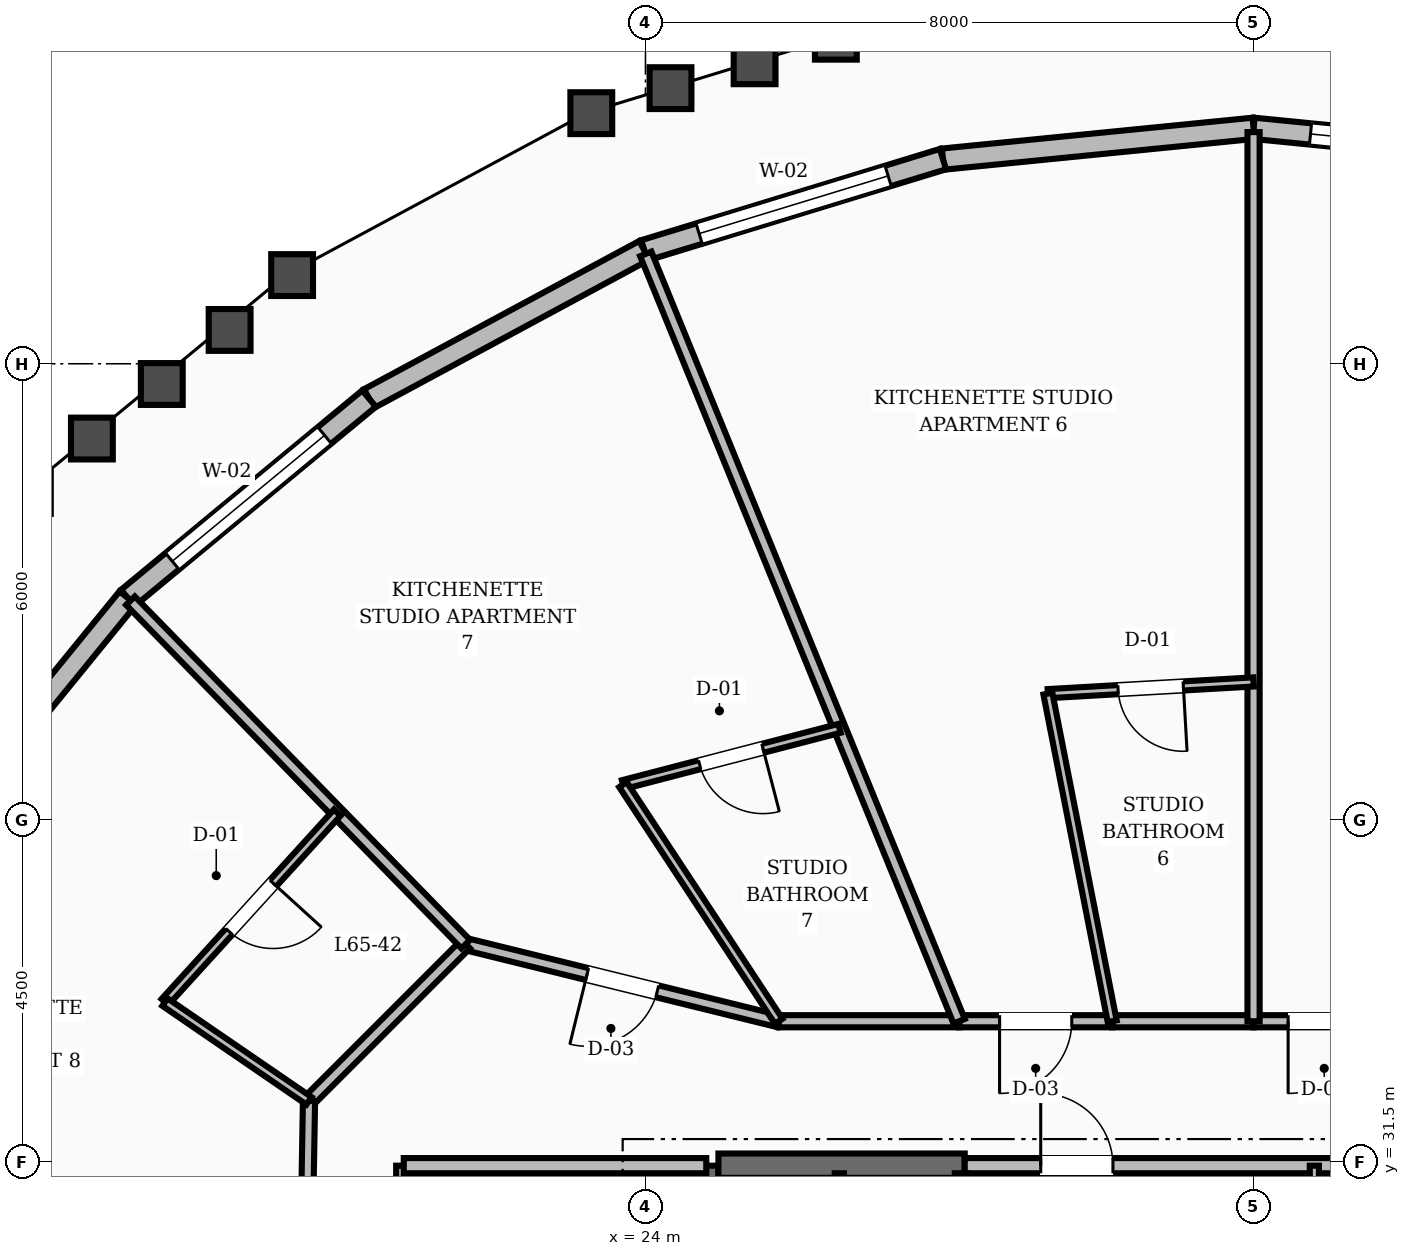
"""IFC4 building model, lengths in metres.
Left out: names, types, materials, properties, quantities, classifications, styles, units other than length and angle.
Written with IfcOpenShell. Run it as: python <this file> out.ifc"""

import sys

from ifc_helpers import new_model, si_unit, direction, frame, frame_2d, origin, place, context, subcontext, project, spatial, rectangle, extrude, element, fill, save


model = new_model("IFC4")
c1 = context("Model", 3, precision=1e-05, world=origin(), true_north=direction((0.0, 1.0)))
c2 = subcontext(c1, "Body", "Model", "MODEL_VIEW")
j1 = project(units=[si_unit("LENGTHUNIT", "METRE"), si_unit("PLANEANGLEUNIT", "RADIAN")], contexts=[c1])
p1 = place(None, origin())
s1 = spatial("IfcSite", under=j1, at=p1, CompositionType="ELEMENT")
p2 = place(p1, origin())
s2 = spatial("IfcBuilding", under=s1, at=p2, CompositionType="ELEMENT")
p3 = place(p2, frame((0.0, 0.0, 250.8)))
s3 = spatial("IfcBuildingStorey", under=s2, at=p3, CompositionType="ELEMENT", Elevation=250.8)
p4 = place(p3, frame((24.8, 25.15, 0.0), z_axis=(0.0, 0.0, 1.0), x_axis=(0.0, 1.0, 0.0)))
e1 = element("IfcWall", 1, at=p4, inside=s3, PredefinedType="SHEAR", context=c2, shape_type="SweptSolid", body=[
    extrude(rectangle(XDim=6.3, YDim=0.32, at=frame_2d((3.15, 0.0))), origin(), (0.0, 0.0, 1.0), 3.6),
])
p5 = place(p3, frame((24.96, 31.45, 0.0), z_axis=(0.0, 0.0, 1.0), x_axis=(1.0, 0.0, 0.0)))
e2 = element("IfcWall", 2, at=p5, inside=s3, PredefinedType="SHEAR", context=c2, shape_type="SweptSolid", body=[
    extrude(rectangle(XDim=3.24, YDim=0.32, at=frame_2d((1.62, 0.0))), origin(), (0.0, 0.0, 1.0), 3.6),
])
p6 = place(p3, frame((36.086, 44.692, 0.0), z_axis=(0.0, 0.0, 1.0), x_axis=(-0.995111670603, 0.098756078441, 0.0)))
e3 = element("IfcWall", 3, at=p6, inside=s3, PredefinedType="STANDARD", context=c2, shape_type="SweptSolid", body=[
    extrude(rectangle(XDim=4.106, YDim=0.28, at=frame_2d((2.053, 0.0))), origin(), (0.0, 0.0, 1.0), 2.88),
])
p7 = place(p6, frame((0.753, 0.0, 0.8)))
e4 = element("IfcOpeningElement", 4, at=p7, cuts=e3, PredefinedType="OPENING", context=c2, shape_type="SweptSolid", body=[
    extrude(rectangle(XDim=2.6, YDim=1.65, at=frame_2d((1.3, 0.825))), frame((0.0, 0.15, 0.0), z_axis=(0.0, -1.0, 0.0), x_axis=(1.0, 0.0, 0.0)), (0.0, 0.0, 1.0), 0.3),
])
p8 = place(p3, frame((32.0, 45.098, 0.0), z_axis=(0.0, 0.0, 1.0), x_axis=(-0.995111670603, -0.098756078441, 0.0)))
e5 = element("IfcWall", 5, at=p8, inside=s3, PredefinedType="STANDARD", context=c2, shape_type="SweptSolid", body=[
    extrude(rectangle(XDim=4.106, YDim=0.28, at=frame_2d((2.053, 0.0))), origin(), (0.0, 0.0, 1.0), 2.88),
])
p9 = place(p3, frame((27.914, 44.692, 0.0), z_axis=(0.0, 0.0, 1.0), x_axis=(-0.956361719018, -0.292185322009, 0.0)))
e6 = element("IfcWall", 6, at=p9, inside=s3, PredefinedType="STANDARD", context=c2, shape_type="SweptSolid", body=[
    extrude(rectangle(XDim=4.108, YDim=0.28, at=frame_2d((2.054, 0.0))), origin(), (0.0, 0.0, 1.0), 2.88),
])
p10 = place(p9, frame((0.754, 0.0, 0.8)))
e7 = element("IfcOpeningElement", 7, at=p10, cuts=e6, PredefinedType="OPENING", context=c2, shape_type="SweptSolid", body=[
    extrude(rectangle(XDim=2.6, YDim=1.65, at=frame_2d((1.3, 0.825))), frame((0.0, 0.15, 0.0), z_axis=(0.0, -1.0, 0.0), x_axis=(1.0, 0.0, 0.0)), (0.0, 0.0, 1.0), 0.3),
])
p11 = place(p3, frame((23.985, 43.492, 0.0), z_axis=(0.0, 0.0, 1.0), x_axis=(-0.880482536711, -0.474078582671, 0.0)))
e8 = element("IfcWall", 8, at=p11, inside=s3, PredefinedType="STANDARD", context=c2, shape_type="SweptSolid", body=[
    extrude(rectangle(XDim=4.113, YDim=0.28, at=frame_2d((2.056, 0.0))), origin(), (0.0, 0.0, 1.0), 2.88),
])
p12 = place(p3, frame((20.364, 41.542, 0.0), z_axis=(0.0, 0.0, 1.0), x_axis=(-0.770756680857, -0.637129609197, 0.0)))
e9 = element("IfcWall", 9, at=p12, inside=s3, PredefinedType="STANDARD", context=c2, shape_type="SweptSolid", body=[
    extrude(rectangle(XDim=4.118, YDim=0.28, at=frame_2d((2.059, 0.0))), origin(), (0.0, 0.0, 1.0), 2.88),
])
p13 = place(p12, frame((0.759, 0.0, 0.8)))
e10 = element("IfcOpeningElement", 10, at=p13, cuts=e9, PredefinedType="OPENING", context=c2, shape_type="SweptSolid", body=[
    extrude(rectangle(XDim=2.6, YDim=1.65, at=frame_2d((1.3, 0.825))), frame((0.0, 0.15, 0.0), z_axis=(0.0, -1.0, 0.0), x_axis=(1.0, 0.0, 0.0)), (0.0, 0.0, 1.0), 0.3),
])
p14 = place(p3, frame((17.189, 38.918, 0.0), z_axis=(0.0, 0.0, 1.0), x_axis=(-0.631637370097, -0.775263976138, 0.0)))
e11 = element("IfcWall", 11, at=p14, inside=s3, PredefinedType="STANDARD", context=c2, shape_type="SweptSolid", body=[
    extrude(rectangle(XDim=4.124, YDim=0.28, at=frame_2d((2.062, 0.0))), origin(), (0.0, 0.0, 1.0), 2.88),
])
p15 = place(p3, frame((20.82, 28.32, 0.0), z_axis=(0.0, 0.0, 1.0), x_axis=(0.0, 1.0, 0.0)))
e12 = element("IfcWall", 12, at=p15, inside=s3, PredefinedType="SOLIDWALL", context=c2, shape_type="SweptSolid", body=[
    extrude(rectangle(XDim=3.13, YDim=0.2, at=frame_2d((1.565, 0.0))), origin(), (0.0, 0.0, 1.0), 2.87),
])
p16 = place(p15, frame((1.09, 0.0, 0.0)))
e13 = element("IfcOpeningElement", 13, at=p16, cuts=e12, PredefinedType="OPENING", context=c2, shape_type="SweptSolid", body=[
    extrude(rectangle(XDim=0.95, YDim=2.1, at=frame_2d((0.475, 1.05))), frame((0.0, 0.11, 0.0), z_axis=(0.0, -1.0, 0.0), x_axis=(1.0, 0.0, 0.0)), (0.0, 0.0, 1.0), 0.22),
])
p17 = place(p3, frame((20.82, 31.45, 0.0), z_axis=(0.0, 0.0, 1.0), x_axis=(1.0, 0.0, 0.0)))
e14 = element("IfcWall", 14, at=p17, inside=s3, PredefinedType="SOLIDWALL", context=c2, shape_type="SweptSolid", body=[
    extrude(rectangle(XDim=3.98, YDim=0.2, at=frame_2d((1.99, 0.0))), origin(), (0.0, 0.0, 1.0), 2.87),
])
p18 = place(p3, frame((28.2, 31.45, 0.0), z_axis=(0.0, 0.0, 1.0), x_axis=(1.0, 0.0, 0.0)))
e15 = element("IfcWall", 15, at=p18, inside=s3, PredefinedType="SOLIDWALL", context=c2, shape_type="SweptSolid", body=[
    extrude(rectangle(XDim=7.6, YDim=0.2, at=frame_2d((3.8, 0.0))), origin(), (0.0, 0.0, 1.0), 2.87),
])
p19 = place(p18, frame((1.0, 0.0, 0.0)))
e16 = element("IfcOpeningElement", 16, at=p19, cuts=e15, PredefinedType="OPENING", context=c2, shape_type="SweptSolid", body=[
    extrude(rectangle(XDim=0.95, YDim=2.1, at=frame_2d((0.475, 1.05))), frame((0.0, 0.11, 0.0), z_axis=(0.0, -1.0, 0.0), x_axis=(1.0, 0.0, 0.0)), (0.0, 0.0, 1.0), 0.22),
])
p20 = place(p3, frame((32.8, 27.95, 0.0), z_axis=(0.0, 0.0, 1.0), x_axis=(0.0, 1.0, 0.0)))
e17 = element("IfcWall", 17, at=p20, inside=s3, PredefinedType="PARTITIONING", context=c2, shape_type="SweptSolid", body=[
    extrude(rectangle(XDim=3.5, YDim=0.12, at=frame_2d((1.75, 0.0))), origin(), (0.0, 0.0, 1.0), 2.87),
])
p21 = place(p3, frame((28.15, 25.25, 0.0), z_axis=(0.0, 0.0, 1.0), x_axis=(0.0, 1.0, 0.0)))
e18 = element("IfcWall", 18, at=p21, inside=s3, PredefinedType="SOLIDWALL", context=c2, shape_type="SweptSolid", body=[
    extrude(rectangle(XDim=6.1, YDim=0.16, at=frame_2d((3.05, 0.0))), origin(), (0.0, 0.0, 1.0), 2.87),
])
p22 = place(p3, frame((26.55, 27.6, 0.0), z_axis=(0.0, 0.0, 1.0), x_axis=(0.0, 1.0, 0.0)))
e19 = element("IfcWall", 19, at=p22, inside=s3, PredefinedType="PARTITIONING", context=c2, shape_type="SweptSolid", body=[
    extrude(rectangle(XDim=3.75, YDim=0.12, at=frame_2d((1.875, 0.0))), origin(), (0.0, 0.0, 1.0), 2.87),
])
p23 = place(p3, frame((33.86, 33.35, 0.0), z_axis=(0.0, 0.0, 1.0), x_axis=(-1.0, 0.0, 0.0)))
e20 = element("IfcWall", 20, at=p23, inside=s3, PredefinedType="SOLIDWALL", context=c2, shape_type="SweptSolid", body=[
    extrude(rectangle(XDim=1.86, YDim=0.16, at=frame_2d((0.93, 0.0))), origin(), (0.0, 0.0, 1.0), 2.87),
])
p24 = place(p23, frame((0.455, 0.0, 0.0)))
e21 = element("IfcOpeningElement", 21, at=p24, cuts=e20, PredefinedType="OPENING", context=c2, shape_type="SweptSolid", body=[
    extrude(rectangle(XDim=0.95, YDim=2.1, at=frame_2d((0.475, 1.05))), frame((0.0, 0.09, 0.0), z_axis=(0.0, -1.0, 0.0), x_axis=(1.0, 0.0, 0.0)), (0.0, 0.0, 1.0), 0.18),
])
p25 = place(p3, frame((32.0, 33.35, 0.0), z_axis=(0.0, 0.0, 1.0), x_axis=(-1.0, 0.0, 0.0)))
e22 = element("IfcWall", 22, at=p25, inside=s3, PredefinedType="SOLIDWALL", context=c2, shape_type="SweptSolid", body=[
    extrude(rectangle(XDim=1.86, YDim=0.16, at=frame_2d((0.93, 0.0))), origin(), (0.0, 0.0, 1.0), 2.87),
])
p26 = place(p3, frame((30.14, 33.35, 0.0), z_axis=(0.0, 0.0, 1.0), x_axis=(-1.0, 0.0, 0.0)))
e23 = element("IfcWall", 23, at=p26, inside=s3, PredefinedType="SOLIDWALL", context=c2, shape_type="SweptSolid", body=[
    extrude(rectangle(XDim=2.013, YDim=0.16, at=frame_2d((1.006, 0.0))), origin(), (0.0, 0.0, 1.0), 2.87),
])
p27 = place(p26, frame((0.531, 0.0, 0.0)))
e24 = element("IfcOpeningElement", 24, at=p27, cuts=e23, PredefinedType="OPENING", context=c2, shape_type="SweptSolid", body=[
    extrude(rectangle(XDim=0.95, YDim=2.1, at=frame_2d((0.475, 1.05))), frame((0.0, 0.09, 0.0), z_axis=(0.0, -1.0, 0.0), x_axis=(1.0, 0.0, 0.0)), (0.0, 0.0, 1.0), 0.18),
])
p28 = place(p3, frame((28.127, 33.35, 0.0), z_axis=(0.0, 0.0, 1.0), x_axis=(-1.0, 0.0, 0.0)))
e25 = element("IfcWall", 25, at=p28, inside=s3, PredefinedType="SOLIDWALL", context=c2, shape_type="SweptSolid", body=[
    extrude(rectangle(XDim=2.375, YDim=0.16, at=frame_2d((1.188, 0.0))), origin(), (0.0, 0.0, 1.0), 2.87),
])
p29 = place(p3, frame((25.752, 33.35, 0.0), z_axis=(0.0, 0.0, 1.0), x_axis=(-0.970939799552, 0.239323850978, 0.0)))
e26 = element("IfcWall", 26, at=p29, inside=s3, PredefinedType="SOLIDWALL", context=c2, shape_type="SweptSolid", body=[
    extrude(rectangle(XDim=4.241, YDim=0.16, at=frame_2d((2.12, 0.0))), origin(), (0.0, 0.0, 1.0), 2.87),
])
p30 = place(p29, frame((1.646, 0.0, 0.0)))
e27 = element("IfcOpeningElement", 27, at=p30, cuts=e26, PredefinedType="OPENING", context=c2, shape_type="SweptSolid", body=[
    extrude(rectangle(XDim=0.95, YDim=2.1, at=frame_2d((0.475, 1.05))), frame((0.0, 0.09, 0.0), z_axis=(0.0, -1.0, 0.0), x_axis=(1.0, 0.0, 0.0)), (0.0, 0.0, 1.0), 0.18),
])
p31 = place(p3, frame((21.635, 34.365, 0.0), z_axis=(0.0, 0.0, 1.0), x_axis=(-0.707106781187, -0.707106781187, 0.0)))
e28 = element("IfcWall", 28, at=p31, inside=s3, PredefinedType="SOLIDWALL", context=c2, shape_type="SweptSolid", body=[
    extrude(rectangle(XDim=2.916, YDim=0.16, at=frame_2d((1.458, 0.0))), origin(), (0.0, 0.0, 1.0), 2.87),
])
p32 = place(p3, frame((19.573, 32.303, 0.0), z_axis=(0.0, 0.0, 1.0), x_axis=(-0.016981035134, -0.999855811828, 0.0)))
e29 = element("IfcWall", 29, at=p32, inside=s3, PredefinedType="SOLIDWALL", context=c2, shape_type="SweptSolid", body=[
    extrude(rectangle(XDim=3.134, YDim=0.16, at=frame_2d((1.567, 0.0))), origin(), (0.0, 0.0, 1.0), 2.87),
])
p33 = place(p32, frame((1.092, 0.0, 0.0)))
e30 = element("IfcOpeningElement", 30, at=p33, cuts=e29, PredefinedType="OPENING", context=c2, shape_type="SweptSolid", body=[
    extrude(rectangle(XDim=0.95, YDim=2.1, at=frame_2d((0.475, 1.05))), frame((0.0, 0.09, 0.0), z_axis=(0.0, -1.0, 0.0), x_axis=(1.0, 0.0, 0.0)), (0.0, 0.0, 1.0), 0.18),
])
p34 = place(p3, frame((32.0, 33.35, 0.0), z_axis=(0.0, 0.0, 1.0), x_axis=(0.0, 1.0, 0.0)))
e31 = element("IfcWall", 31, at=p34, inside=s3, PredefinedType="SOLIDWALL", context=c2, shape_type="SweptSolid", body=[
    extrude(rectangle(XDim=11.698, YDim=0.16, at=frame_2d((5.849, 0.0))), origin(), (0.0, 0.0, 1.0), 2.87),
])
p35 = place(p3, frame((32.0, 37.814, 0.0), z_axis=(0.0, 0.0, 1.0), x_axis=(-0.998378070768, -0.056931782074, 0.0)))
e32 = element("IfcWall", 32, at=p35, inside=s3, PredefinedType="PARTITIONING", context=c2, shape_type="SweptSolid", body=[
    extrude(rectangle(XDim=2.71, YDim=0.12, at=frame_2d((1.355, 0.0))), origin(), (0.0, 0.0, 1.0), 2.87),
])
p36 = place(p35, frame((0.925, 0.0, 0.0)))
e33 = element("IfcOpeningElement", 33, at=p36, cuts=e32, PredefinedType="OPENING", context=c2, shape_type="SweptSolid", body=[
    extrude(rectangle(XDim=0.86, YDim=2.1, at=frame_2d((0.43, 1.05))), frame((0.0, 0.07, 0.0), z_axis=(0.0, -1.0, 0.0), x_axis=(1.0, 0.0, 0.0)), (0.0, 0.0, 1.0), 0.14),
])
p37 = place(p3, frame((30.14, 33.35, 0.0), z_axis=(0.0, 0.0, 1.0), x_axis=(-0.192608630394, 0.981275657243, 0.0)))
e34 = element("IfcWall", 34, at=p37, inside=s3, PredefinedType="PARTITIONING", context=c2, shape_type="SweptSolid", body=[
    extrude(rectangle(XDim=4.392, YDim=0.12, at=frame_2d((2.196, 0.0))), origin(), (0.0, 0.0, 1.0), 2.87),
])
p38 = place(p3, frame((28.127, 33.35, 0.0), z_axis=(0.0, 0.0, 1.0), x_axis=(-0.378155079747, 0.925742262005, 0.0)))
e35 = element("IfcWall", 35, at=p38, inside=s3, PredefinedType="SOLIDWALL", context=c2, shape_type="SweptSolid", body=[
    extrude(rectangle(XDim=10.905, YDim=0.16, at=frame_2d((5.453, 0.0))), origin(), (0.0, 0.0, 1.0), 2.87),
])
p39 = place(p3, frame((26.553, 37.204, 0.0), z_axis=(0.0, 0.0, 1.0), x_axis=(-0.967790580385, -0.251756613651, 0.0)))
e36 = element("IfcWall", 36, at=p39, inside=s3, PredefinedType="PARTITIONING", context=c2, shape_type="SweptSolid", body=[
    extrude(rectangle(XDim=2.943, YDim=0.12, at=frame_2d((1.472, 0.0))), origin(), (0.0, 0.0, 1.0), 2.87),
])
p40 = place(p39, frame((1.042, 0.0, 0.0)))
e37 = element("IfcOpeningElement", 37, at=p40, cuts=e36, PredefinedType="OPENING", context=c2, shape_type="SweptSolid", body=[
    extrude(rectangle(XDim=0.86, YDim=2.1, at=frame_2d((0.43, 1.05))), frame((0.0, 0.07, 0.0), z_axis=(0.0, -1.0, 0.0), x_axis=(1.0, 0.0, 0.0)), (0.0, 0.0, 1.0), 0.14),
])
p41 = place(p3, frame((25.752, 33.35, 0.0), z_axis=(0.0, 0.0, 1.0), x_axis=(-0.549609280911, 0.835421832571, 0.0)))
e38 = element("IfcWall", 38, at=p41, inside=s3, PredefinedType="PARTITIONING", context=c2, shape_type="SweptSolid", body=[
    extrude(rectangle(XDim=3.726, YDim=0.12, at=frame_2d((1.863, 0.0))), origin(), (0.0, 0.0, 1.0), 2.87),
])
p42 = place(p3, frame((21.635, 34.365, 0.0), z_axis=(0.0, 0.0, 1.0), x_axis=(-0.698587637664, 0.715524501679, 0.0)))
e39 = element("IfcWall", 39, at=p42, inside=s3, PredefinedType="SOLIDWALL", context=c2, shape_type="SweptSolid", body=[
    extrude(rectangle(XDim=6.314, YDim=0.16, at=frame_2d((3.157, 0.0))), origin(), (0.0, 0.0, 1.0), 2.87),
])
p43 = place(p3, frame((19.946, 36.095, 0.0), z_axis=(0.0, 0.0, 1.0), x_axis=(-0.672964763425, -0.739674541395, 0.0)))
e40 = element("IfcWall", 40, at=p43, inside=s3, PredefinedType="PARTITIONING", context=c2, shape_type="SweptSolid", body=[
    extrude(rectangle(XDim=3.371, YDim=0.12, at=frame_2d((1.685, 0.0))), origin(), (0.0, 0.0, 1.0), 2.87),
])
p44 = place(p43, frame((1.255, 0.0, 0.0)))
e41 = element("IfcOpeningElement", 41, at=p44, cuts=e40, PredefinedType="OPENING", context=c2, shape_type="SweptSolid", body=[
    extrude(rectangle(XDim=0.86, YDim=2.1, at=frame_2d((0.43, 1.05))), frame((0.0, 0.07, 0.0), z_axis=(0.0, -1.0, 0.0), x_axis=(1.0, 0.0, 0.0)), (0.0, 0.0, 1.0), 0.14),
])
p45 = place(p3, frame((19.573, 32.303, 0.0), z_axis=(0.0, 0.0, 1.0), x_axis=(-0.824955305645, 0.565197968581, 0.0)))
e42 = element("IfcWall", 42, at=p45, inside=s3, PredefinedType="PARTITIONING", context=c2, shape_type="SweptSolid", body=[
    extrude(rectangle(XDim=2.298, YDim=0.12, at=frame_2d((1.149, 0.0))), origin(), (0.0, 0.0, 1.0), 2.87),
])
p46 = place(p3, frame((19.52, 29.169, 0.0), z_axis=(0.0, 0.0, 1.0), x_axis=(-0.921093629339, 0.38934114346, 0.0)))
e43 = element("IfcWall", 43, at=p46, inside=s3, PredefinedType="SOLIDWALL", context=c2, shape_type="SweptSolid", body=[
    extrude(rectangle(XDim=7.409, YDim=0.16, at=frame_2d((3.705, 0.0))), origin(), (0.0, 0.0, 1.0), 2.87),
])
p47 = place(p7, origin())
e44 = element("IfcWindow", 44, at=p47, inside=s3, PartitioningType="SINGLE_PANEL", PredefinedType="WINDOW", context=c2, shape_type="SweptSolid", body=[
    extrude(rectangle(XDim=2.6, YDim=1.65, at=frame_2d((1.3, 0.825))), frame((0.0, 0.03, 0.0), z_axis=(0.0, -1.0, 0.0), x_axis=(1.0, 0.0, 0.0)), (0.0, 0.0, 1.0), 0.06),
])
fill(e4, e44)
p48 = place(p10, origin())
e45 = element("IfcWindow", 45, at=p48, inside=s3, PartitioningType="SINGLE_PANEL", PredefinedType="WINDOW", context=c2, shape_type="SweptSolid", body=[
    extrude(rectangle(XDim=2.6, YDim=1.65, at=frame_2d((1.3, 0.825))), frame((0.0, 0.03, 0.0), z_axis=(0.0, -1.0, 0.0), x_axis=(1.0, 0.0, 0.0)), (0.0, 0.0, 1.0), 0.06),
])
fill(e7, e45)
p49 = place(p13, origin())
e46 = element("IfcWindow", 46, at=p49, inside=s3, PartitioningType="SINGLE_PANEL", PredefinedType="WINDOW", context=c2, shape_type="SweptSolid", body=[
    extrude(rectangle(XDim=2.6, YDim=1.65, at=frame_2d((1.3, 0.825))), frame((0.0, 0.03, 0.0), z_axis=(0.0, -1.0, 0.0), x_axis=(1.0, 0.0, 0.0)), (0.0, 0.0, 1.0), 0.06),
])
fill(e10, e46)
p50 = place(p19, origin())
e47 = element("IfcDoor", 47, at=p50, inside=s3, OperationType="SINGLE_SWING_LEFT", PredefinedType="DOOR", context=c2, shape_type="SweptSolid", body=[
    extrude(rectangle(XDim=0.95, YDim=2.1, at=frame_2d((0.475, 1.05))), frame((0.0, 0.025, 0.0), z_axis=(0.0, -1.0, 0.0), x_axis=(1.0, 0.0, 0.0)), (0.0, 0.0, 1.0), 0.05),
])
fill(e16, e47)
p51 = place(p24, origin())
e48 = element("IfcDoor", 48, at=p51, inside=s3, OperationType="SINGLE_SWING_RIGHT", PredefinedType="DOOR", context=c2, shape_type="SweptSolid", body=[
    extrude(rectangle(XDim=0.95, YDim=2.1, at=frame_2d((0.475, 1.05))), frame((0.0, 0.025, 0.0), z_axis=(0.0, -1.0, 0.0), x_axis=(1.0, 0.0, 0.0)), (0.0, 0.0, 1.0), 0.05),
])
fill(e21, e48)
p52 = place(p36, origin())
e49 = element("IfcDoor", 49, at=p52, inside=s3, OperationType="SINGLE_SWING_LEFT", PredefinedType="DOOR", context=c2, shape_type="SweptSolid", body=[
    extrude(rectangle(XDim=0.86, YDim=2.1, at=frame_2d((0.43, 1.05))), frame((0.0, 0.025, 0.0), z_axis=(0.0, -1.0, 0.0), x_axis=(1.0, 0.0, 0.0)), (0.0, 0.0, 1.0), 0.05),
])
fill(e33, e49)
p53 = place(p27, origin())
e50 = element("IfcDoor", 50, at=p53, inside=s3, OperationType="SINGLE_SWING_RIGHT", PredefinedType="DOOR", context=c2, shape_type="SweptSolid", body=[
    extrude(rectangle(XDim=0.95, YDim=2.1, at=frame_2d((0.475, 1.05))), frame((0.0, 0.025, 0.0), z_axis=(0.0, -1.0, 0.0), x_axis=(1.0, 0.0, 0.0)), (0.0, 0.0, 1.0), 0.05),
])
fill(e24, e50)
p54 = place(p40, origin())
e51 = element("IfcDoor", 51, at=p54, inside=s3, OperationType="SINGLE_SWING_LEFT", PredefinedType="DOOR", context=c2, shape_type="SweptSolid", body=[
    extrude(rectangle(XDim=0.86, YDim=2.1, at=frame_2d((0.43, 1.05))), frame((0.0, 0.025, 0.0), z_axis=(0.0, -1.0, 0.0), x_axis=(1.0, 0.0, 0.0)), (0.0, 0.0, 1.0), 0.05),
])
fill(e37, e51)
p55 = place(p30, origin())
e52 = element("IfcDoor", 52, at=p55, inside=s3, OperationType="SINGLE_SWING_RIGHT", PredefinedType="DOOR", context=c2, shape_type="SweptSolid", body=[
    extrude(rectangle(XDim=0.95, YDim=2.1, at=frame_2d((0.475, 1.05))), frame((0.0, 0.025, 0.0), z_axis=(0.0, -1.0, 0.0), x_axis=(1.0, 0.0, 0.0)), (0.0, 0.0, 1.0), 0.05),
])
fill(e27, e52)
p56 = place(p44, origin())
e53 = element("IfcDoor", 53, at=p56, inside=s3, OperationType="SINGLE_SWING_LEFT", PredefinedType="DOOR", context=c2, shape_type="SweptSolid", body=[
    extrude(rectangle(XDim=0.86, YDim=2.1, at=frame_2d((0.43, 1.05))), frame((0.0, 0.025, 0.0), z_axis=(0.0, -1.0, 0.0), x_axis=(1.0, 0.0, 0.0)), (0.0, 0.0, 1.0), 0.05),
])
fill(e41, e53)
save(model, sys.argv[1])
